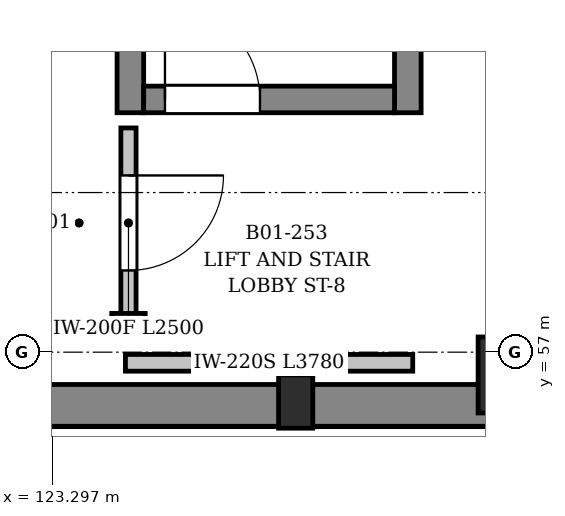
"""IFC4 building model, lengths in metres.
Left out: names, types, materials, properties, quantities, classifications, styles, units other than length and angle.
Written with IfcOpenShell. Run it as: python <this file> out.ifc"""

import sys

from ifc_helpers import new_model, si_unit, direction, frame, frame_2d, origin, origin_2d, place, context, subcontext, project, spatial, rectangle, extrude, element, fill, save


model = new_model("IFC4")
c1 = context("Model", 3, precision=1e-05, world=origin(), true_north=direction((0.0, 1.0)))
c2 = subcontext(c1, "Body", "Model", "MODEL_VIEW")
j1 = project(units=[si_unit("LENGTHUNIT", "METRE"), si_unit("PLANEANGLEUNIT", "RADIAN")], contexts=[c1])
p1 = place(None, origin())
s1 = spatial("IfcSite", under=j1, at=p1, CompositionType="ELEMENT")
p2 = place(p1, origin())
s2 = spatial("IfcBuilding", under=s1, at=p2, CompositionType="ELEMENT")
p3 = place(p2, frame((0.0, 0.0, -5.4)))
s3 = spatial("IfcBuildingStorey", under=s2, at=p3, CompositionType="ELEMENT", Elevation=-5.4)
p4 = place(p3, frame((129.4, 56.7, 0.0), z_axis=(0.0, 0.0, 1.0), x_axis=(1.0, 0.0, 0.0)))
e1 = element("IfcColumn", 1, at=p4, inside=s3, PredefinedType="COLUMN", context=c2, shape_type="SweptSolid", body=[
    extrude(rectangle(XDim=1.0, YDim=1.0, at=origin_2d()), origin(), (0.0, 0.0, 1.0), 4.98),
])
p5 = place(p3, frame((126.5, 56.35, 0.0), z_axis=(0.0, 0.0, 1.0), x_axis=(1.0, 0.0, 0.0)))
e2 = element("IfcColumn", 2, at=p5, inside=s3, PredefinedType="PILASTER", context=c2, shape_type="SweptSolid", body=[
    extrude(rectangle(XDim=0.45, YDim=0.7, at=origin_2d()), origin(), (0.0, 0.0, 1.0), 4.98),
])
p6 = place(p3, frame((163.562, 56.3, 0.0), z_axis=(0.0, 0.0, 1.0), x_axis=(-1.0, 0.0, 0.0)))
e3 = element("IfcWall", 3, at=p6, inside=s3, PredefinedType="USERDEFINED", context=c2, shape_type="SweptSolid", body=[
    extrude(rectangle(XDim=49.125, YDim=0.55, at=frame_2d((24.562, 0.0))), origin(), (0.0, 0.0, 1.0), 4.98),
])
for number, where, z_axis, x_axis in (
    (4, (127.975, 60.15, 0.0), (0.0, 0.0, 1.0), (0.0, 1.0, 0.0)),
    (5, (124.325, 69.45, 0.0), (0.0, 0.0, 1.0), (0.0, -1.0, 0.0)),
):
    element("IfcWall", number, at=place(p3, frame(where, z_axis=z_axis, x_axis=x_axis)), inside=s3, PredefinedType="SHEAR", context=c2, shape_type="SweptSolid", body=[
        extrude(rectangle(XDim=9.3, YDim=0.35, at=frame_2d((4.65, 0.0))), origin(), (0.0, 0.0, 1.0), 4.98),
    ])
p7 = place(p3, frame((124.5, 60.325, 0.0), z_axis=(0.0, 0.0, 1.0), x_axis=(1.0, 0.0, 0.0)))
e6 = element("IfcWall", 6, at=p7, inside=s3, PredefinedType="SHEAR", context=c2, shape_type="SweptSolid", body=[
    extrude(rectangle(XDim=3.3, YDim=0.35, at=frame_2d((1.65, 0.0))), origin(), (0.0, 0.0, 1.0), 4.98),
])
p8 = place(p7, frame((0.28, 0.0, 0.0)))
e7 = element("IfcOpeningElement", 7, at=p8, cuts=e6, PredefinedType="OPENING", context=c2, shape_type="SweptSolid", body=[
    extrude(rectangle(XDim=1.25, YDim=2.2, at=frame_2d((0.625, 1.1))), frame((0.0, 0.185, 0.0), z_axis=(0.0, -1.0, 0.0), x_axis=(1.0, 0.0, 0.0)), (0.0, 0.0, 1.0), 0.37),
])
p9 = place(p3, frame((124.3, 59.95, 0.0), z_axis=(0.0, 0.0, 1.0), x_axis=(0.0, -1.0, 0.0)))
e8 = element("IfcWall", 8, at=p9, inside=s3, PredefinedType="PARTITIONING", context=c2, shape_type="SweptSolid", body=[
    extrude(rectangle(XDim=2.5, YDim=0.2, at=frame_2d((1.25, 0.0))), origin(), (0.0, 0.0, 1.0), 4.98),
])
p10 = place(p9, frame((0.625, 0.0, 0.0)))
e9 = element("IfcOpeningElement", 9, at=p10, cuts=e8, PredefinedType="OPENING", context=c2, shape_type="SweptSolid", body=[
    extrude(rectangle(XDim=1.25, YDim=2.2, at=frame_2d((0.625, 1.1))), frame((0.0, 0.11, 0.0), z_axis=(0.0, -1.0, 0.0), x_axis=(1.0, 0.0, 0.0)), (0.0, 0.0, 1.0), 0.22),
])
p11 = place(p3, frame((128.04, 56.86, 0.0), z_axis=(0.0, 0.0, 1.0), x_axis=(-1.0, 0.0, 0.0)))
e10 = element("IfcWall", 10, at=p11, inside=s3, PredefinedType="SOLIDWALL", context=c2, shape_type="SweptSolid", body=[
    extrude(rectangle(XDim=3.78, YDim=0.22, at=frame_2d((1.89, 0.0))), origin(), (0.0, 0.0, 1.0), 4.12),
])
p12 = place(p3, frame((124.08, 57.45, 0.0), z_axis=(0.0, 0.0, 1.0), x_axis=(1.0, 0.0, 0.0)))
e11 = element("IfcWall", 11, at=p12, inside=s3, PredefinedType="PARTITIONING", context=c2, shape_type="SweptSolid", body=[
    extrude(rectangle(XDim=0.44, YDim=0.12, at=frame_2d((0.22, 0.0))), origin(), (0.0, 0.0, 1.0), 4.98),
])
p13 = place(p8, origin())
e12 = element("IfcDoor", 12, at=p13, inside=s3, OperationType="SINGLE_SWING_LEFT", PredefinedType="DOOR", context=c2, shape_type="SweptSolid", body=[
    extrude(rectangle(XDim=1.25, YDim=2.2, at=frame_2d((0.625, 1.1))), frame((0.0, 0.025, 0.0), z_axis=(0.0, -1.0, 0.0), x_axis=(1.0, 0.0, 0.0)), (0.0, 0.0, 1.0), 0.05),
])
fill(e7, e12)
p14 = place(p10, origin())
e13 = element("IfcDoor", 13, at=p14, inside=s3, OperationType="SINGLE_SWING_LEFT", PredefinedType="DOOR", context=c2, shape_type="SweptSolid", body=[
    extrude(rectangle(XDim=1.25, YDim=2.2, at=frame_2d((0.625, 1.1))), frame((0.0, 0.025, 0.0), z_axis=(0.0, -1.0, 0.0), x_axis=(1.0, 0.0, 0.0)), (0.0, 0.0, 1.0), 0.05),
])
fill(e9, e13)
save(model, sys.argv[1])
